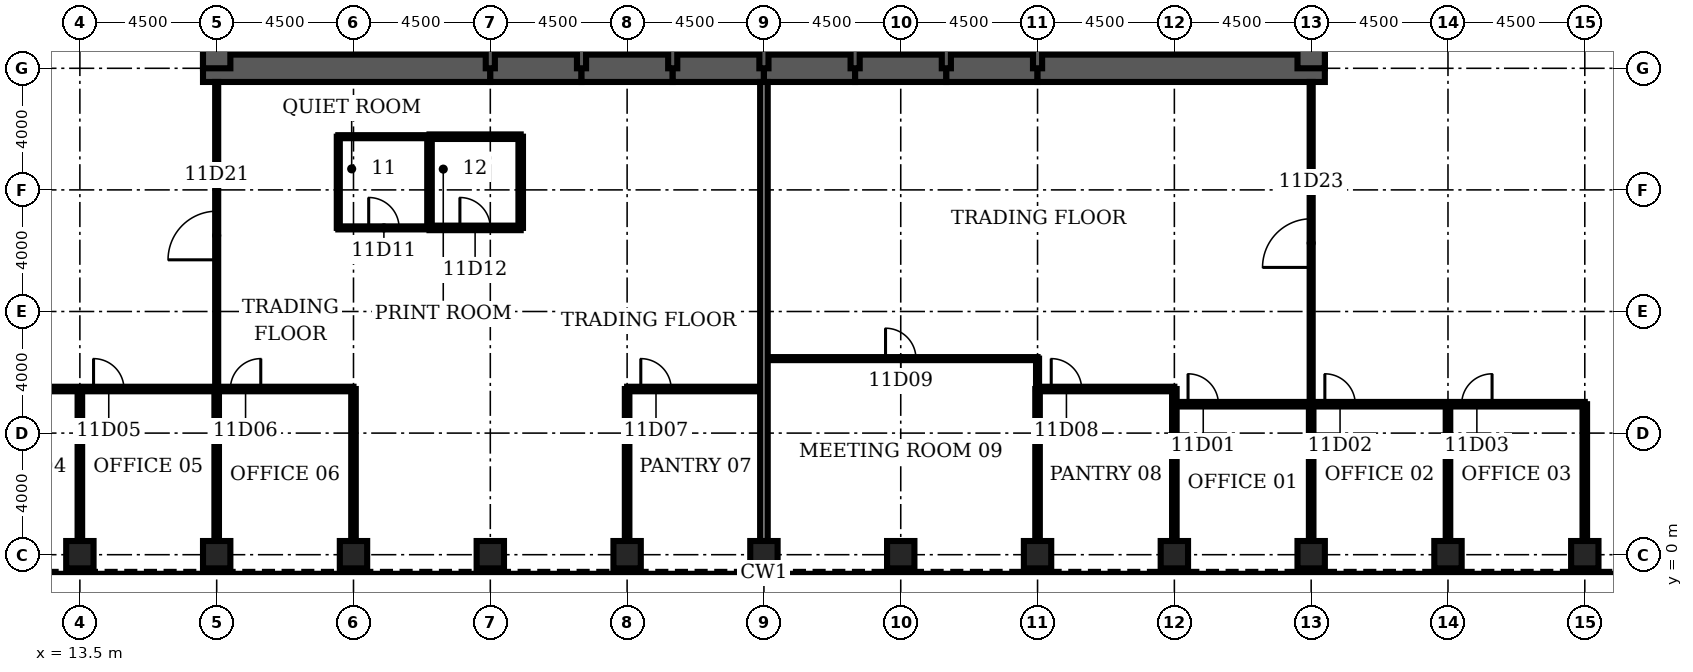
"""IFC4 building model, lengths in metres.
Left out: names, types, materials, properties, quantities, classifications, styles, units other than length and angle.
Written with IfcOpenShell. Run it as: python <this file> out.ifc"""

import sys

from ifc_helpers import new_model, si_unit, direction, frame, frame_2d, origin, origin_2d, place, context, subcontext, project, spatial, rectangle, hollow_rectangle, extrude, element, fill, save


model = new_model("IFC4")
c1 = context("Model", 3, precision=1e-05, world=origin(), true_north=direction((0.0, 1.0)))
c2 = subcontext(c1, "Body", "Model", "MODEL_VIEW")
j1 = project(units=[si_unit("LENGTHUNIT", "METRE"), si_unit("PLANEANGLEUNIT", "RADIAN")], contexts=[c1])
p1 = place(None, origin())
s1 = spatial("IfcSite", under=j1, at=p1, CompositionType="ELEMENT")
p2 = place(p1, origin())
s2 = spatial("IfcBuilding", under=s1, at=p2, CompositionType="ELEMENT")
p3 = place(p2, frame((0.0, 0.0, 54.5)))
s3 = spatial("IfcBuildingStorey", under=s2, at=p3, CompositionType="ELEMENT", Elevation=54.5)
for number, where, z_axis, x_axis in (
    (1, (13.5, 0.0, 0.0), (0.0, 0.0, 1.0), (0.0, 1.0, 0.0)),
    (2, (18.0, 0.0, 0.0), (0.0, 0.0, 1.0), (0.0, 1.0, 0.0)),
    (3, (22.5, 0.0, 0.0), (0.0, 0.0, 1.0), (0.0, 1.0, 0.0)),
    (4, (27.0, 0.0, 0.0), (0.0, 0.0, 1.0), (0.0, 1.0, 0.0)),
    (5, (31.5, 0.0, 0.0), (0.0, 0.0, 1.0), (0.0, 1.0, 0.0)),
    (6, (36.0, 0.0, 0.0), (0.0, 0.0, 1.0), (0.0, 1.0, 0.0)),
    (7, (40.5, 0.0, 0.0), (0.0, 0.0, 1.0), (0.0, 1.0, 0.0)),
    (8, (45.0, 0.0, 0.0), (0.0, 0.0, 1.0), (0.0, 1.0, 0.0)),
    (9, (49.5, 0.0, 0.0), (0.0, 0.0, 1.0), (0.0, 1.0, 0.0)),
    (10, (54.0, 0.0, 0.0), (0.0, 0.0, 1.0), (0.0, 1.0, 0.0)),
    (11, (58.5, 0.0, 0.0), (0.0, 0.0, 1.0), (0.0, 1.0, 0.0)),
    (12, (63.0, 0.0, 0.0), (0.0, 0.0, 1.0), (0.0, 1.0, 0.0)),
):
    element("IfcColumn", number, at=place(p3, frame(where, z_axis=z_axis, x_axis=x_axis)), inside=s3, PredefinedType="COLUMN", context=c2, shape_type="SweptSolid", body=[
        extrude(hollow_rectangle(XDim=0.9, YDim=0.9, WallThickness=0.12, at=origin_2d()), origin(), (0.0, 0.0, 1.0), 4.5),
    ])
p4 = place(p3, frame((17.55, 16.0, 0.0), z_axis=(0.0, 0.0, 1.0), x_axis=(1.0, 0.0, 0.0)))
e13 = element("IfcWall", 13, at=p4, inside=s3, PredefinedType="SHEAR", context=c2, shape_type="SweptSolid", body=[
    extrude(rectangle(XDim=9.45, YDim=0.9, at=frame_2d((4.725, 0.0))), origin(), (0.0, 0.0, 1.0), 4.5),
])
for number, where, z_axis, x_axis in (
    (14, (27.0, 16.0, 0.0), (0.0, 0.0, 1.0), (1.0, 0.0, 0.0)),
    (15, (30.0, 16.0, 0.0), (0.0, 0.0, 1.0), (1.0, 0.0, 0.0)),
    (16, (33.0, 16.0, 0.0), (0.0, 0.0, 1.0), (1.0, 0.0, 0.0)),
    (17, (36.0, 16.0, 0.0), (0.0, 0.0, 1.0), (1.0, 0.0, 0.0)),
    (18, (39.0, 16.0, 0.0), (0.0, 0.0, 1.0), (1.0, 0.0, 0.0)),
    (19, (42.0, 16.0, 0.0), (0.0, 0.0, 1.0), (1.0, 0.0, 0.0)),
):
    element("IfcWall", number, at=place(p3, frame(where, z_axis=z_axis, x_axis=x_axis)), inside=s3, PredefinedType="SHEAR", context=c2, shape_type="SweptSolid", body=[
        extrude(rectangle(XDim=3.0, YDim=0.9, at=frame_2d((1.5, 0.0))), origin(), (0.0, 0.0, 1.0), 4.5),
    ])
p5 = place(p3, frame((45.0, 16.0, 0.0), z_axis=(0.0, 0.0, 1.0), x_axis=(1.0, 0.0, 0.0)))
e20 = element("IfcWall", 20, at=p5, inside=s3, PredefinedType="SHEAR", context=c2, shape_type="SweptSolid", body=[
    extrude(rectangle(XDim=9.45, YDim=0.9, at=frame_2d((4.725, 0.0))), origin(), (0.0, 0.0, 1.0), 4.5),
])
for number, where, z_axis, x_axis in (
    (21, (18.0, 19.2, 0.0), (0.0, 0.0, 1.0), (0.0, -1.0, 0.0)),
    (22, (54.0, 16.0, 0.0), (0.0, 0.0, 1.0), (0.0, 1.0, 0.0)),
):
    element("IfcWall", number, at=place(p3, frame(where, z_axis=z_axis, x_axis=x_axis)), inside=s3, PredefinedType="SHEAR", context=c2, shape_type="SweptSolid", body=[
        extrude(rectangle(XDim=3.2, YDim=0.9, at=frame_2d((1.6, 0.0))), origin(), (0.0, 0.0, 1.0), 4.5),
    ])
for number, where, z_axis, x_axis in (
    (23, (27.0, 16.0, 0.0), (0.0, 0.0, 1.0), (0.0, 1.0, 0.0)),
    (24, (30.0, 16.0, 0.0), (0.0, 0.0, 1.0), (0.0, 1.0, 0.0)),
    (25, (33.0, 16.0, 0.0), (0.0, 0.0, 1.0), (0.0, 1.0, 0.0)),
    (26, (36.0, 16.0, 0.0), (0.0, 0.0, 1.0), (0.0, 1.0, 0.0)),
    (27, (39.0, 16.0, 0.0), (0.0, 0.0, 1.0), (0.0, 1.0, 0.0)),
    (28, (42.0, 16.0, 0.0), (0.0, 0.0, 1.0), (0.0, 1.0, 0.0)),
    (29, (45.0, 16.0, 0.0), (0.0, 0.0, 1.0), (0.0, 1.0, 0.0)),
):
    element("IfcWall", number, at=place(p3, frame(where, z_axis=z_axis, x_axis=x_axis)), inside=s3, PredefinedType="SOLIDWALL", context=c2, shape_type="SweptSolid", body=[
        extrude(rectangle(XDim=3.2, YDim=0.3, at=frame_2d((1.6, 0.0))), origin(), (0.0, 0.0, 1.0), 4.5),
    ])
p6 = place(p3, frame((49.5, 4.95, 0.0), z_axis=(0.0, 0.0, 1.0), x_axis=(1.0, 0.0, 0.0)))
e30 = element("IfcWall", 30, at=p6, inside=s3, PredefinedType="PARTITIONING", context=c2, shape_type="SweptSolid", body=[
    extrude(rectangle(XDim=13.5, YDim=0.15, at=frame_2d((6.75, 0.0))), origin(), (0.0, 0.0, 1.0), 3.0),
])
p7 = place(p6, frame((0.45, 0.0, 0.0)))
e31 = element("IfcOpeningElement", 31, at=p7, cuts=e30, PredefinedType="OPENING", context=c2, shape_type="SweptSolid", body=[
    extrude(rectangle(XDim=1.0, YDim=2.1, at=frame_2d((0.5, 1.05))), frame((0.0, 0.085, 0.0), z_axis=(0.0, -1.0, 0.0), x_axis=(1.0, 0.0, 0.0)), (0.0, 0.0, 1.0), 0.17),
])
p8 = place(p6, frame((4.95, 0.0, 0.0)))
e32 = element("IfcOpeningElement", 32, at=p8, cuts=e30, PredefinedType="OPENING", context=c2, shape_type="SweptSolid", body=[
    extrude(rectangle(XDim=1.0, YDim=2.1, at=frame_2d((0.5, 1.05))), frame((0.0, 0.085, 0.0), z_axis=(0.0, -1.0, 0.0), x_axis=(1.0, 0.0, 0.0)), (0.0, 0.0, 1.0), 0.17),
])
p9 = place(p6, frame((9.45, 0.0, 0.0)))
e33 = element("IfcOpeningElement", 33, at=p9, cuts=e30, PredefinedType="OPENING", context=c2, shape_type="SweptSolid", body=[
    extrude(rectangle(XDim=1.0, YDim=2.1, at=frame_2d((0.5, 1.05))), frame((0.0, 0.085, 0.0), z_axis=(0.0, -1.0, 0.0), x_axis=(1.0, 0.0, 0.0)), (0.0, 0.0, 1.0), 0.17),
])
p10 = place(p3, frame((9.0, 5.45, 0.0), z_axis=(0.0, 0.0, 1.0), x_axis=(1.0, 0.0, 0.0)))
e34 = element("IfcWall", 34, at=p10, inside=s3, PredefinedType="PARTITIONING", context=c2, shape_type="SweptSolid", body=[
    extrude(rectangle(XDim=13.5, YDim=0.15, at=frame_2d((6.75, 0.0))), origin(), (0.0, 0.0, 1.0), 3.0),
])
p11 = place(p10, frame((0.45, 0.0, 0.0)))
e35 = element("IfcOpeningElement", 35, at=p11, cuts=e34, PredefinedType="OPENING", context=c2, shape_type="SweptSolid", body=[
    extrude(rectangle(XDim=1.0, YDim=2.1, at=frame_2d((0.5, 1.05))), frame((0.0, 0.085, 0.0), z_axis=(0.0, -1.0, 0.0), x_axis=(1.0, 0.0, 0.0)), (0.0, 0.0, 1.0), 0.17),
])
p12 = place(p10, frame((4.95, 0.0, 0.0)))
e36 = element("IfcOpeningElement", 36, at=p12, cuts=e34, PredefinedType="OPENING", context=c2, shape_type="SweptSolid", body=[
    extrude(rectangle(XDim=1.0, YDim=2.1, at=frame_2d((0.5, 1.05))), frame((0.0, 0.085, 0.0), z_axis=(0.0, -1.0, 0.0), x_axis=(1.0, 0.0, 0.0)), (0.0, 0.0, 1.0), 0.17),
])
p13 = place(p10, frame((9.45, 0.0, 0.0)))
e37 = element("IfcOpeningElement", 37, at=p13, cuts=e34, PredefinedType="OPENING", context=c2, shape_type="SweptSolid", body=[
    extrude(rectangle(XDim=1.0, YDim=2.1, at=frame_2d((0.5, 1.05))), frame((0.0, 0.085, 0.0), z_axis=(0.0, -1.0, 0.0), x_axis=(1.0, 0.0, 0.0)), (0.0, 0.0, 1.0), 0.17),
])
p14 = place(p3, frame((31.5, 5.45, 0.0), z_axis=(0.0, 0.0, 1.0), x_axis=(1.0, 0.0, 0.0)))
e38 = element("IfcWall", 38, at=p14, inside=s3, PredefinedType="PARTITIONING", context=c2, shape_type="SweptSolid", body=[
    extrude(rectangle(XDim=4.5, YDim=0.15, at=frame_2d((2.25, 0.0))), origin(), (0.0, 0.0, 1.0), 3.0),
])
p15 = place(p14, frame((0.45, 0.0, 0.0)))
e39 = element("IfcOpeningElement", 39, at=p15, cuts=e38, PredefinedType="OPENING", context=c2, shape_type="SweptSolid", body=[
    extrude(rectangle(XDim=1.0, YDim=2.1, at=frame_2d((0.5, 1.05))), frame((0.0, 0.085, 0.0), z_axis=(0.0, -1.0, 0.0), x_axis=(1.0, 0.0, 0.0)), (0.0, 0.0, 1.0), 0.17),
])
p16 = place(p3, frame((45.0, 5.45, 0.0), z_axis=(0.0, 0.0, 1.0), x_axis=(1.0, 0.0, 0.0)))
e40 = element("IfcWall", 40, at=p16, inside=s3, PredefinedType="PARTITIONING", context=c2, shape_type="SweptSolid", body=[
    extrude(rectangle(XDim=4.5, YDim=0.15, at=frame_2d((2.25, 0.0))), origin(), (0.0, 0.0, 1.0), 3.0),
])
p17 = place(p16, frame((0.45, 0.0, 0.0)))
e41 = element("IfcOpeningElement", 41, at=p17, cuts=e40, PredefinedType="OPENING", context=c2, shape_type="SweptSolid", body=[
    extrude(rectangle(XDim=1.0, YDim=2.1, at=frame_2d((0.5, 1.05))), frame((0.0, 0.085, 0.0), z_axis=(0.0, -1.0, 0.0), x_axis=(1.0, 0.0, 0.0)), (0.0, 0.0, 1.0), 0.17),
])
p18 = place(p3, frame((36.0, 6.45, 0.0), z_axis=(0.0, 0.0, 1.0), x_axis=(1.0, 0.0, 0.0)))
e42 = element("IfcWall", 42, at=p18, inside=s3, PredefinedType="PARTITIONING", context=c2, shape_type="SweptSolid", body=[
    extrude(rectangle(XDim=9.0, YDim=0.1, at=frame_2d((4.5, 0.0))), origin(), (0.0, 0.0, 1.0), 3.0),
])
p19 = place(p18, frame((4.0, 0.0, 0.0)))
e43 = element("IfcOpeningElement", 43, at=p19, cuts=e42, PredefinedType="OPENING", context=c2, shape_type="SweptSolid", body=[
    extrude(rectangle(XDim=1.0, YDim=2.1, at=frame_2d((0.5, 1.05))), frame((0.0, 0.06, 0.0), z_axis=(0.0, -1.0, 0.0), x_axis=(1.0, 0.0, 0.0)), (0.0, 0.0, 1.0), 0.12),
])
p20 = place(p3, frame((22.0, 10.75, 0.0), z_axis=(0.0, 0.0, 1.0), x_axis=(1.0, 0.0, 0.0)))
e44 = element("IfcWall", 44, at=p20, inside=s3, PredefinedType="PARTITIONING", context=c2, shape_type="SweptSolid", body=[
    extrude(rectangle(XDim=3.0, YDim=0.1, at=frame_2d((1.5, 0.0))), origin(), (0.0, 0.0, 1.0), 3.0),
])
p21 = place(p20, frame((1.0, 0.0, 0.0)))
e45 = element("IfcOpeningElement", 45, at=p21, cuts=e44, PredefinedType="OPENING", context=c2, shape_type="SweptSolid", body=[
    extrude(rectangle(XDim=1.0, YDim=2.1, at=frame_2d((0.5, 1.05))), frame((0.0, 0.06, 0.0), z_axis=(0.0, -1.0, 0.0), x_axis=(1.0, 0.0, 0.0)), (0.0, 0.0, 1.0), 0.12),
])
p22 = place(p3, frame((25.0, 10.75, 0.0), z_axis=(0.0, 0.0, 1.0), x_axis=(1.0, 0.0, 0.0)))
e46 = element("IfcWall", 46, at=p22, inside=s3, PredefinedType="PARTITIONING", context=c2, shape_type="SweptSolid", body=[
    extrude(rectangle(XDim=3.0, YDim=0.15, at=frame_2d((1.5, 0.0))), origin(), (0.0, 0.0, 1.0), 3.0),
])
p23 = place(p22, frame((1.0, 0.0, 0.0)))
e47 = element("IfcOpeningElement", 47, at=p23, cuts=e46, PredefinedType="OPENING", context=c2, shape_type="SweptSolid", body=[
    extrude(rectangle(XDim=1.0, YDim=2.1, at=frame_2d((0.5, 1.05))), frame((0.0, 0.085, 0.0), z_axis=(0.0, -1.0, 0.0), x_axis=(1.0, 0.0, 0.0)), (0.0, 0.0, 1.0), 0.17),
])
p24 = place(p3, frame((22.0, 13.75, 0.0), z_axis=(0.0, 0.0, 1.0), x_axis=(1.0, 0.0, 0.0)))
e48 = element("IfcWall", 48, at=p24, inside=s3, PredefinedType="PARTITIONING", context=c2, shape_type="SweptSolid", body=[
    extrude(rectangle(XDim=3.0, YDim=0.1, at=frame_2d((1.5, 0.0))), origin(), (0.0, 0.0, 1.0), 3.0),
])
p25 = place(p3, frame((25.0, 13.75, 0.0), z_axis=(0.0, 0.0, 1.0), x_axis=(1.0, 0.0, 0.0)))
e49 = element("IfcWall", 49, at=p25, inside=s3, PredefinedType="PARTITIONING", context=c2, shape_type="SweptSolid", body=[
    extrude(rectangle(XDim=3.0, YDim=0.15, at=frame_2d((1.5, 0.0))), origin(), (0.0, 0.0, 1.0), 3.0),
])
for number, where, z_axis, x_axis in (
    (50, (13.5, 0.45, 0.0), (0.0, 0.0, 1.0), (0.0, 1.0, 0.0)),
    (51, (18.0, 0.45, 0.0), (0.0, 0.0, 1.0), (0.0, 1.0, 0.0)),
):
    element("IfcWall", number, at=place(p3, frame(where, z_axis=z_axis, x_axis=x_axis)), inside=s3, PredefinedType="PARTITIONING", context=c2, shape_type="SweptSolid", body=[
        extrude(rectangle(XDim=5.0, YDim=0.15, at=frame_2d((2.5, 0.0))), origin(), (0.0, 0.0, 1.0), 3.0),
    ])
p26 = place(p3, frame((18.0, 5.45, 0.0), z_axis=(0.0, 0.0, 1.0), x_axis=(0.0, 1.0, 0.0)))
e52 = element("IfcWall", 52, at=p26, inside=s3, PredefinedType="PARTITIONING", context=c2, shape_type="SweptSolid", body=[
    extrude(rectangle(XDim=10.1, YDim=0.1, at=frame_2d((5.05, 0.0))), origin(), (0.0, 0.0, 1.0), 3.0),
])
p27 = place(p26, frame((4.25, 0.0, 0.0)))
e53 = element("IfcOpeningElement", 53, at=p27, cuts=e52, PredefinedType="OPENING", context=c2, shape_type="SweptSolid", body=[
    extrude(rectangle(XDim=1.6, YDim=2.1, at=frame_2d((0.8, 1.05))), frame((0.0, 0.06, 0.0), z_axis=(0.0, -1.0, 0.0), x_axis=(1.0, 0.0, 0.0)), (0.0, 0.0, 1.0), 0.12),
])
p28 = place(p3, frame((22.0, 10.75, 0.0), z_axis=(0.0, 0.0, 1.0), x_axis=(0.0, 1.0, 0.0)))
e54 = element("IfcWall", 54, at=p28, inside=s3, PredefinedType="PARTITIONING", context=c2, shape_type="SweptSolid", body=[
    extrude(rectangle(XDim=3.0, YDim=0.1, at=frame_2d((1.5, 0.0))), origin(), (0.0, 0.0, 1.0), 3.0),
])
p29 = place(p3, frame((22.5, 0.45, 0.0), z_axis=(0.0, 0.0, 1.0), x_axis=(0.0, 1.0, 0.0)))
e55 = element("IfcWall", 55, at=p29, inside=s3, PredefinedType="PARTITIONING", context=c2, shape_type="SweptSolid", body=[
    extrude(rectangle(XDim=5.0, YDim=0.15, at=frame_2d((2.5, 0.0))), origin(), (0.0, 0.0, 1.0), 3.0),
])
for number, where, z_axis, x_axis in (
    (56, (25.0, 10.75, 0.0), (0.0, 0.0, 1.0), (0.0, 1.0, 0.0)),
    (57, (28.0, 10.75, 0.0), (0.0, 0.0, 1.0), (0.0, 1.0, 0.0)),
):
    element("IfcWall", number, at=place(p3, frame(where, z_axis=z_axis, x_axis=x_axis)), inside=s3, PredefinedType="PARTITIONING", context=c2, shape_type="SweptSolid", body=[
        extrude(rectangle(XDim=3.0, YDim=0.15, at=frame_2d((1.5, 0.0))), origin(), (0.0, 0.0, 1.0), 3.0),
    ])
p30 = place(p3, frame((31.5, 0.45, 0.0), z_axis=(0.0, 0.0, 1.0), x_axis=(0.0, 1.0, 0.0)))
e58 = element("IfcWall", 58, at=p30, inside=s3, PredefinedType="PARTITIONING", context=c2, shape_type="SweptSolid", body=[
    extrude(rectangle(XDim=5.0, YDim=0.15, at=frame_2d((2.5, 0.0))), origin(), (0.0, 0.0, 1.0), 3.0),
])
p31 = place(p3, frame((36.0, 0.45, 0.0), z_axis=(0.0, 0.0, 1.0), x_axis=(0.0, 1.0, 0.0)))
e59 = element("IfcWall", 59, at=p31, inside=s3, PredefinedType="PARTITIONING", context=c2, shape_type="SweptSolid", body=[
    extrude(rectangle(XDim=15.1, YDim=0.25, at=frame_2d((7.55, 0.0))), origin(), (0.0, 0.0, 1.0), 3.0),
])
p32 = place(p3, frame((45.0, 0.45, 0.0), z_axis=(0.0, 0.0, 1.0), x_axis=(0.0, 1.0, 0.0)))
e60 = element("IfcWall", 60, at=p32, inside=s3, PredefinedType="PARTITIONING", context=c2, shape_type="SweptSolid", body=[
    extrude(rectangle(XDim=5.0, YDim=0.15, at=frame_2d((2.5, 0.0))), origin(), (0.0, 0.0, 1.0), 3.0),
])
p33 = place(p3, frame((45.0, 5.45, 0.0), z_axis=(0.0, 0.0, 1.0), x_axis=(0.0, 1.0, 0.0)))
e61 = element("IfcWall", 61, at=p33, inside=s3, PredefinedType="PARTITIONING", context=c2, shape_type="SweptSolid", body=[
    extrude(rectangle(XDim=1.0, YDim=0.1, at=frame_2d((0.5, 0.0))), origin(), (0.0, 0.0, 1.0), 3.0),
])
p34 = place(p3, frame((49.5, 0.45, 0.0), z_axis=(0.0, 0.0, 1.0), x_axis=(0.0, 1.0, 0.0)))
e62 = element("IfcWall", 62, at=p34, inside=s3, PredefinedType="PARTITIONING", context=c2, shape_type="SweptSolid", body=[
    extrude(rectangle(XDim=5.0, YDim=0.15, at=frame_2d((2.5, 0.0))), origin(), (0.0, 0.0, 1.0), 3.0),
])
p35 = place(p3, frame((54.0, 0.45, 0.0), z_axis=(0.0, 0.0, 1.0), x_axis=(0.0, 1.0, 0.0)))
e63 = element("IfcWall", 63, at=p35, inside=s3, PredefinedType="PARTITIONING", context=c2, shape_type="SweptSolid", body=[
    extrude(rectangle(XDim=4.5, YDim=0.15, at=frame_2d((2.25, 0.0))), origin(), (0.0, 0.0, 1.0), 3.0),
])
p36 = place(p3, frame((54.0, 4.95, 0.0), z_axis=(0.0, 0.0, 1.0), x_axis=(0.0, 1.0, 0.0)))
e64 = element("IfcWall", 64, at=p36, inside=s3, PredefinedType="PARTITIONING", context=c2, shape_type="SweptSolid", body=[
    extrude(rectangle(XDim=10.6, YDim=0.1, at=frame_2d((5.3, 0.0))), origin(), (0.0, 0.0, 1.0), 3.0),
])
p37 = place(p36, frame((4.5, 0.0, 0.0)))
e65 = element("IfcOpeningElement", 65, at=p37, cuts=e64, PredefinedType="OPENING", context=c2, shape_type="SweptSolid", body=[
    extrude(rectangle(XDim=1.6, YDim=2.1, at=frame_2d((0.8, 1.05))), frame((0.0, 0.06, 0.0), z_axis=(0.0, -1.0, 0.0), x_axis=(1.0, 0.0, 0.0)), (0.0, 0.0, 1.0), 0.12),
])
for number, where, z_axis, x_axis in (
    (66, (58.5, 0.45, 0.0), (0.0, 0.0, 1.0), (0.0, 1.0, 0.0)),
    (67, (63.0, 0.45, 0.0), (0.0, 0.0, 1.0), (0.0, 1.0, 0.0)),
):
    element("IfcWall", number, at=place(p3, frame(where, z_axis=z_axis, x_axis=x_axis)), inside=s3, PredefinedType="PARTITIONING", context=c2, shape_type="SweptSolid", body=[
        extrude(rectangle(XDim=4.5, YDim=0.15, at=frame_2d((2.25, 0.0))), origin(), (0.0, 0.0, 1.0), 3.0),
    ])
p38 = place(p7, origin())
e68 = element("IfcDoor", 68, at=p38, inside=s3, OperationType="SINGLE_SWING_LEFT", PredefinedType="DOOR", context=c2, shape_type="SweptSolid", body=[
    extrude(rectangle(XDim=1.0, YDim=2.1, at=frame_2d((0.5, 1.05))), frame((0.0, 0.025, 0.0), z_axis=(0.0, -1.0, 0.0), x_axis=(1.0, 0.0, 0.0)), (0.0, 0.0, 1.0), 0.05),
])
fill(e31, e68)
p39 = place(p8, origin())
e69 = element("IfcDoor", 69, at=p39, inside=s3, OperationType="SINGLE_SWING_LEFT", PredefinedType="DOOR", context=c2, shape_type="SweptSolid", body=[
    extrude(rectangle(XDim=1.0, YDim=2.1, at=frame_2d((0.5, 1.05))), frame((0.0, 0.025, 0.0), z_axis=(0.0, -1.0, 0.0), x_axis=(1.0, 0.0, 0.0)), (0.0, 0.0, 1.0), 0.05),
])
fill(e32, e69)
p40 = place(p9, origin())
e70 = element("IfcDoor", 70, at=p40, inside=s3, OperationType="SINGLE_SWING_RIGHT", PredefinedType="DOOR", context=c2, shape_type="SweptSolid", body=[
    extrude(rectangle(XDim=1.0, YDim=2.1, at=frame_2d((0.5, 1.05))), frame((0.0, 0.025, 0.0), z_axis=(0.0, -1.0, 0.0), x_axis=(1.0, 0.0, 0.0)), (0.0, 0.0, 1.0), 0.05),
])
fill(e33, e70)
p41 = place(p12, origin())
e71 = element("IfcDoor", 71, at=p41, inside=s3, OperationType="SINGLE_SWING_LEFT", PredefinedType="DOOR", context=c2, shape_type="SweptSolid", body=[
    extrude(rectangle(XDim=1.0, YDim=2.1, at=frame_2d((0.5, 1.05))), frame((0.0, 0.025, 0.0), z_axis=(0.0, -1.0, 0.0), x_axis=(1.0, 0.0, 0.0)), (0.0, 0.0, 1.0), 0.05),
])
fill(e36, e71)
p42 = place(p13, origin())
e72 = element("IfcDoor", 72, at=p42, inside=s3, OperationType="SINGLE_SWING_RIGHT", PredefinedType="DOOR", context=c2, shape_type="SweptSolid", body=[
    extrude(rectangle(XDim=1.0, YDim=2.1, at=frame_2d((0.5, 1.05))), frame((0.0, 0.025, 0.0), z_axis=(0.0, -1.0, 0.0), x_axis=(1.0, 0.0, 0.0)), (0.0, 0.0, 1.0), 0.05),
])
fill(e37, e72)
p43 = place(p15, origin())
e73 = element("IfcDoor", 73, at=p43, inside=s3, OperationType="SINGLE_SWING_LEFT", PredefinedType="DOOR", context=c2, shape_type="SweptSolid", body=[
    extrude(rectangle(XDim=1.0, YDim=2.1, at=frame_2d((0.5, 1.05))), frame((0.0, 0.025, 0.0), z_axis=(0.0, -1.0, 0.0), x_axis=(1.0, 0.0, 0.0)), (0.0, 0.0, 1.0), 0.05),
])
fill(e39, e73)
p44 = place(p17, origin())
e74 = element("IfcDoor", 74, at=p44, inside=s3, OperationType="SINGLE_SWING_LEFT", PredefinedType="DOOR", context=c2, shape_type="SweptSolid", body=[
    extrude(rectangle(XDim=1.0, YDim=2.1, at=frame_2d((0.5, 1.05))), frame((0.0, 0.025, 0.0), z_axis=(0.0, -1.0, 0.0), x_axis=(1.0, 0.0, 0.0)), (0.0, 0.0, 1.0), 0.05),
])
fill(e41, e74)
p45 = place(p19, origin())
e75 = element("IfcDoor", 75, at=p45, inside=s3, OperationType="SINGLE_SWING_LEFT", PredefinedType="DOOR", context=c2, shape_type="SweptSolid", body=[
    extrude(rectangle(XDim=1.0, YDim=2.1, at=frame_2d((0.5, 1.05))), frame((0.0, 0.025, 0.0), z_axis=(0.0, -1.0, 0.0), x_axis=(1.0, 0.0, 0.0)), (0.0, 0.0, 1.0), 0.05),
])
fill(e43, e75)
p46 = place(p21, origin())
e76 = element("IfcDoor", 76, at=p46, inside=s3, OperationType="SINGLE_SWING_LEFT", PredefinedType="DOOR", context=c2, shape_type="SweptSolid", body=[
    extrude(rectangle(XDim=1.0, YDim=2.1, at=frame_2d((0.5, 1.05))), frame((0.0, 0.025, 0.0), z_axis=(0.0, -1.0, 0.0), x_axis=(1.0, 0.0, 0.0)), (0.0, 0.0, 1.0), 0.05),
])
fill(e45, e76)
p47 = place(p23, origin())
e77 = element("IfcDoor", 77, at=p47, inside=s3, OperationType="SINGLE_SWING_LEFT", PredefinedType="DOOR", context=c2, shape_type="SweptSolid", body=[
    extrude(rectangle(XDim=1.0, YDim=2.1, at=frame_2d((0.5, 1.05))), frame((0.0, 0.025, 0.0), z_axis=(0.0, -1.0, 0.0), x_axis=(1.0, 0.0, 0.0)), (0.0, 0.0, 1.0), 0.05),
])
fill(e47, e77)
p48 = place(p27, origin())
e78 = element("IfcDoor", 78, at=p48, inside=s3, OperationType="SINGLE_SWING_LEFT", PredefinedType="DOOR", context=c2, shape_type="SweptSolid", body=[
    extrude(rectangle(XDim=1.6, YDim=2.1, at=frame_2d((0.8, 1.05))), frame((0.0, 0.025, 0.0), z_axis=(0.0, -1.0, 0.0), x_axis=(1.0, 0.0, 0.0)), (0.0, 0.0, 1.0), 0.05),
])
fill(e53, e78)
p49 = place(p37, origin())
e79 = element("IfcDoor", 79, at=p49, inside=s3, OperationType="SINGLE_SWING_LEFT", PredefinedType="DOOR", context=c2, shape_type="SweptSolid", body=[
    extrude(rectangle(XDim=1.6, YDim=2.1, at=frame_2d((0.8, 1.05))), frame((0.0, 0.025, 0.0), z_axis=(0.0, -1.0, 0.0), x_axis=(1.0, 0.0, 0.0)), (0.0, 0.0, 1.0), 0.05),
])
fill(e65, e79)
save(model, sys.argv[1])
